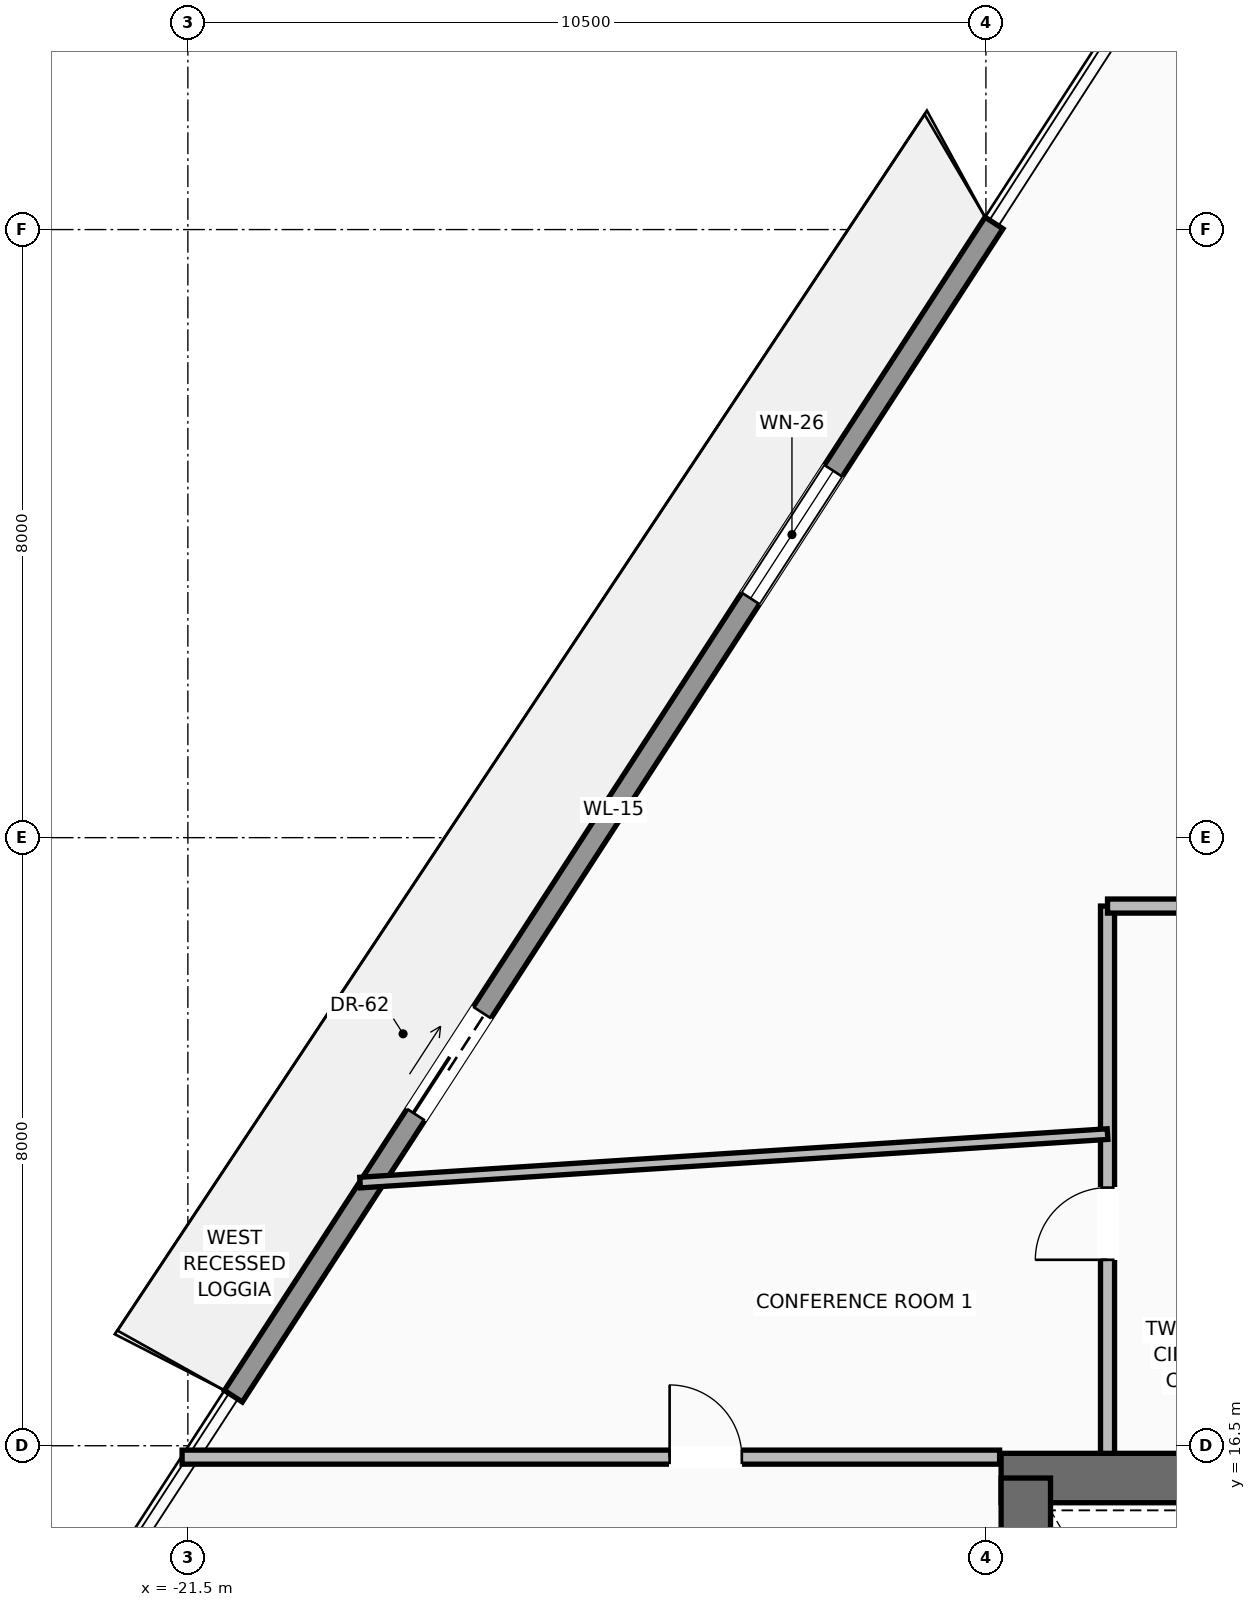
"""IFC4 building model, lengths in metres.
Left out: names, types, materials, properties, quantities, classifications, styles, units other than length and angle.
Written with IfcOpenShell. Run it as: python <this file> out.ifc"""

import sys

from ifc_helpers import new_model, si_unit, direction, frame, frame_2d, origin, place, context, subcontext, project, spatial, rectangle, extrude, source, transform, mapped, element, fill, save


model = new_model("IFC4")
c1 = context("Model", 3, precision=1e-05, world=origin(), true_north=direction((0.0, 1.0)))
c2 = subcontext(c1, "Body", "Model", "MODEL_VIEW")
j1 = project(units=[si_unit("LENGTHUNIT", "METRE"), si_unit("PLANEANGLEUNIT", "RADIAN")], contexts=[c1])
p1 = place(None, origin())
s1 = spatial("IfcSite", under=j1, at=p1, CompositionType="ELEMENT")
p2 = place(p1, origin())
s2 = spatial("IfcBuilding", under=s1, at=p2, CompositionType="ELEMENT")
p3 = place(p2, frame((0.0, 0.0, 144.1)))
s3 = spatial("IfcBuildingStorey", under=s2, at=p3, CompositionType="ELEMENT", Elevation=144.1)
p4 = place(p3, frame((-10.8, 16.075, 0.0), z_axis=(0.0, 0.0, 1.0), x_axis=(1.0, 0.0, 0.0)))
e1 = element("IfcWall", 1, at=p4, inside=s3, PredefinedType="SHEAR", context=c2, shape_type="SweptSolid", body=[
    extrude(rectangle(XDim=21.6, YDim=0.65, at=frame_2d((10.8, 0.0))), origin(), (0.0, 0.0, 1.0), 3.47),
])
p5 = place(p4, frame((3.37, 0.0, 0.0)))
e2 = element("IfcOpeningElement", 2, at=p5, cuts=e1, PredefinedType="OPENING", context=c2, shape_type="SweptSolid", body=[
    extrude(rectangle(XDim=1.3, YDim=2.3, at=frame_2d((0.65, 1.15))), frame((0.0, 0.335, 0.0), z_axis=(0.0, -1.0, 0.0), x_axis=(1.0, 0.0, 0.0)), (0.0, 0.0, 1.0), 0.67),
])
p6 = place(p4, frame((9.8, 0.0, 0.0)))
e3 = element("IfcOpeningElement", 3, at=p6, cuts=e1, PredefinedType="OPENING", context=c2, shape_type="SweptSolid", body=[
    extrude(rectangle(XDim=2.0, YDim=2.4, at=frame_2d((1.0, 1.2))), frame((0.0, 0.335, 0.0), z_axis=(0.0, -1.0, 0.0), x_axis=(1.0, 0.0, 0.0)), (0.0, 0.0, 1.0), 0.67),
])
p7 = place(p3, frame((-10.475, 0.525, 0.0), z_axis=(0.0, 0.0, 1.0), x_axis=(0.0, 1.0, 0.0)))
e4 = element("IfcWall", 4, at=p7, inside=s3, PredefinedType="SHEAR", context=c2, shape_type="SweptSolid", body=[
    extrude(rectangle(XDim=15.55, YDim=0.65, at=frame_2d((7.775, 0.0))), origin(), (0.0, 0.0, 1.0), 3.47),
])
p8 = place(p3, frame((-20.901, 17.152, 0.0), z_axis=(0.0, 0.0, 1.0), x_axis=(0.544015380352, 0.839075244505, 0.0)))
e5 = element("IfcWall", 5, at=p8, inside=s3, PredefinedType="SOLIDWALL", context=c2, shape_type="SweptSolid", body=[
    extrude(rectangle(XDim=18.396, YDim=0.28, at=frame_2d((9.198, 0.0))), origin(), (0.0, 0.0, 1.0), 3.05),
])
p9 = place(p8, frame((4.415, 0.0, 0.0)))
e6 = element("IfcOpeningElement", 6, at=p9, cuts=e5, PredefinedType="OPENING", context=c2, shape_type="SweptSolid", body=[
    extrude(rectangle(XDim=1.6, YDim=2.35, at=frame_2d((0.8, 1.175))), frame((0.0, 0.15, 0.0), z_axis=(0.0, -1.0, 0.0), x_axis=(1.0, 0.0, 0.0)), (0.0, 0.0, 1.0), 0.3),
])
p10 = place(p8, frame((12.509, 0.0, 0.9)))
e7 = element("IfcOpeningElement", 7, at=p10, cuts=e5, PredefinedType="OPENING", context=c2, shape_type="SweptSolid", body=[
    extrude(rectangle(XDim=2.0, YDim=1.85, at=frame_2d((1.0, 0.925))), frame((0.0, 0.15, 0.0), z_axis=(0.0, -1.0, 0.0), x_axis=(1.0, 0.0, 0.0)), (0.0, 0.0, 1.0), 0.3),
])
p11 = place(p3, frame((-9.4, 16.4, 0.0), z_axis=(0.0, 0.0, 1.0), x_axis=(0.0, 1.0, 0.0)))
e8 = element("IfcWall", 8, at=p11, inside=s3, PredefinedType="PARTITIONING", context=c2, shape_type="SweptSolid", body=[
    extrude(rectangle(XDim=7.2, YDim=0.185, at=frame_2d((3.6, 0.0))), origin(), (0.0, 0.0, 1.0), 3.462),
])
p12 = place(p11, frame((2.546, 0.0, 0.0)))
e9 = element("IfcOpeningElement", 9, at=p12, cuts=e8, PredefinedType="OPENING", context=c2, shape_type="SweptSolid", body=[
    extrude(rectangle(XDim=0.95, YDim=2.2, at=frame_2d((0.475, 1.1))), frame((0.0, 0.103, 0.0), z_axis=(0.0, -1.0, 0.0), x_axis=(1.0, 0.0, 0.0)), (0.0, 0.0, 1.0), 0.205),
])
p13 = place(p3, frame((-9.4, 23.6, 0.0), z_axis=(0.0, 0.0, 1.0), x_axis=(1.0, 0.0, 0.0)))
e10 = element("IfcWall", 10, at=p13, inside=s3, PredefinedType="PARTITIONING", context=c2, shape_type="SweptSolid", body=[
    extrude(rectangle(XDim=2.2, YDim=0.185, at=frame_2d((1.1, 0.0))), origin(), (0.0, 0.0, 1.0), 3.462),
])
p14 = place(p3, frame((-21.576, 16.35, 0.0), z_axis=(0.0, 0.0, 1.0), x_axis=(1.0, 0.0, 0.0)))
e11 = element("IfcWall", 11, at=p14, inside=s3, PredefinedType="PARTITIONING", context=c2, shape_type="SweptSolid", body=[
    extrude(rectangle(XDim=10.756, YDim=0.185, at=frame_2d((5.378, 0.0))), origin(), (0.0, 0.0, 1.0), 3.462),
])
p15 = place(p14, frame((6.414, 0.0, 0.0)))
e12 = element("IfcOpeningElement", 12, at=p15, cuts=e11, PredefinedType="OPENING", context=c2, shape_type="SweptSolid", body=[
    extrude(rectangle(XDim=0.95, YDim=2.2, at=frame_2d((0.475, 1.1))), frame((0.0, 0.103, 0.0), z_axis=(0.0, -1.0, 0.0), x_axis=(1.0, 0.0, 0.0)), (0.0, 0.0, 1.0), 0.205),
])
p16 = place(p3, frame((-19.234, 19.962, 0.0), z_axis=(0.0, 0.0, 1.0), x_axis=(0.997901003893, 0.064757906313, 0.0)))
e13 = element("IfcWall", 13, at=p16, inside=s3, PredefinedType="PARTITIONING", context=c2, shape_type="SweptSolid", body=[
    extrude(rectangle(XDim=9.855, YDim=0.14, at=frame_2d((4.927, 0.0))), origin(), (0.0, 0.0, 1.0), 3.462),
])
m1 = source(origin(), c2, "Body", "SweptSolid", [
    extrude(rectangle(XDim=1.6, YDim=2.35, at=frame_2d((0.8, 1.175))), frame((0.0, 0.025, 0.0), z_axis=(0.0, -1.0, 0.0), x_axis=(1.0, 0.0, 0.0)), (0.0, 0.0, 1.0), 0.05),
])
p17 = place(p9, origin())
e14 = element("IfcDoor", 14, at=p17, inside=s3, OperationType="SLIDING_TO_LEFT", PredefinedType="DOOR", context=c2, shape_type="MappedRepresentation", body=[
    mapped(m1, transform((0.0, 0.0, 0.0), scale=1.0)),
])
fill(e6, e14)
m2 = source(origin(), c2, "Body", "SweptSolid", [
    extrude(rectangle(XDim=2.0, YDim=1.85, at=frame_2d((1.0, 0.925))), frame((0.0, 0.03, 0.0), z_axis=(0.0, -1.0, 0.0), x_axis=(1.0, 0.0, 0.0)), (0.0, 0.0, 1.0), 0.06),
])
p18 = place(p10, origin())
e15 = element("IfcWindow", 15, at=p18, inside=s3, PartitioningType="SINGLE_PANEL", PredefinedType="WINDOW", context=c2, shape_type="MappedRepresentation", body=[
    mapped(m2, transform((0.0, 0.0, 0.0), scale=1.0)),
])
fill(e7, e15)
m3 = source(origin(), c2, "Body", "SweptSolid", [
    extrude(rectangle(XDim=0.95, YDim=2.2, at=frame_2d((0.475, 1.1))), frame((0.0, 0.025, 0.0), z_axis=(0.0, -1.0, 0.0), x_axis=(1.0, 0.0, 0.0)), (0.0, 0.0, 1.0), 0.05),
])
p19 = place(p12, origin())
e16 = element("IfcDoor", 16, at=p19, inside=s3, OperationType="SINGLE_SWING_LEFT", PredefinedType="DOOR", context=c2, shape_type="MappedRepresentation", body=[
    mapped(m3, transform((0.0, 0.0, 0.0), scale=1.0)),
])
fill(e9, e16)
p20 = place(p15, origin())
e17 = element("IfcDoor", 17, at=p20, inside=s3, OperationType="SINGLE_SWING_LEFT", PredefinedType="DOOR", context=c2, shape_type="MappedRepresentation", body=[
    mapped(m3, transform((0.0, 0.0, 0.0), scale=1.0)),
])
fill(e12, e17)
save(model, sys.argv[1])
